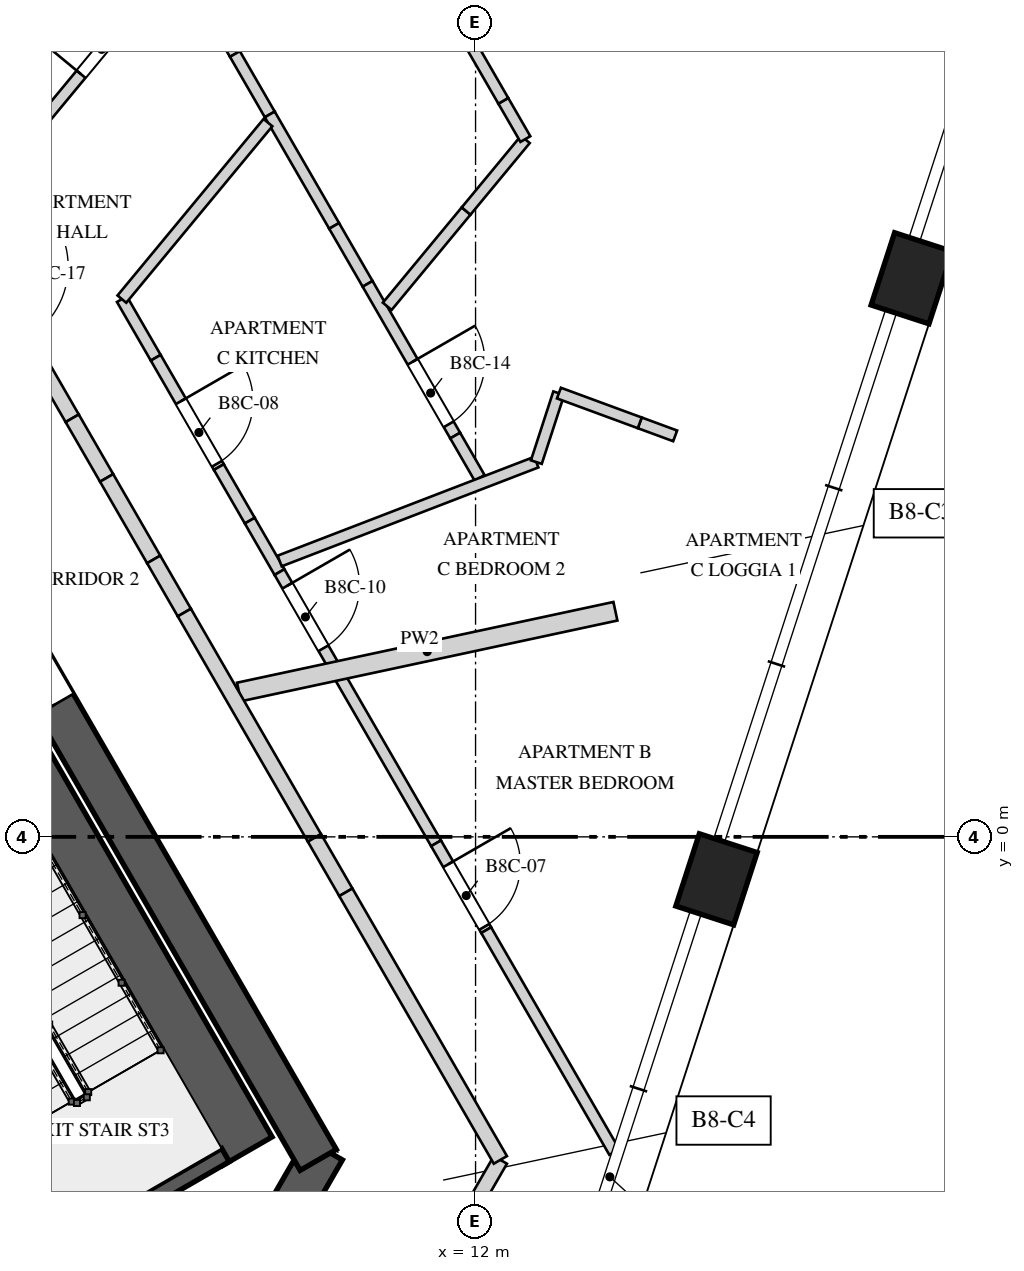
"""IFC4 building model, lengths in metres.
Left out: names, types, materials, properties, quantities, classifications, styles, units other than length and angle.
Written with IfcOpenShell. Run it as: python <this file> out.ifc"""

import sys

from ifc_helpers import new_model, si_unit, direction, frame, frame_2d, origin, origin_2d, place, context, subcontext, project, spatial, polyline, rectangle, outline, extrude, element, fill, save


model = new_model("IFC4")
c1 = context("Model", 3, precision=1e-05, world=origin(), true_north=direction((0.0, 1.0)))
c2 = subcontext(c1, "Body", "Model", "MODEL_VIEW")
j1 = project(units=[si_unit("LENGTHUNIT", "METRE"), si_unit("PLANEANGLEUNIT", "RADIAN")], contexts=[c1])
p1 = place(None, origin())
s1 = spatial("IfcSite", under=j1, at=p1, CompositionType="ELEMENT")
p2 = place(p1, origin())
s2 = spatial("IfcBuilding", under=s1, at=p2, CompositionType="ELEMENT")
p3 = place(p2, frame((0.0, 0.0, 348.4)))
s3 = spatial("IfcBuildingStorey", under=s2, at=p3, CompositionType="ELEMENT", Elevation=348.4)
p4 = place(p3, frame((8.566, -6.613, 0.0), z_axis=(0.0, 0.0, 1.0), x_axis=(0.499995765644, 0.866027848477, 0.0)))
e1 = element("IfcWall", 1, at=p4, inside=s3, PredefinedType="SHEAR", context=c2, shape_type="SweptSolid", body=[
    extrude(rectangle(XDim=2.887, YDim=0.55, at=frame_2d((1.443, 0.0))), origin(), (0.0, 0.0, 1.0), 4.0),
])
p5 = place(p3, frame((9.93, -4.25, 0.0), z_axis=(0.0, 0.0, 1.0), x_axis=(-0.499994590896, 0.86602852671, 0.0)))
e2 = element("IfcWall", 2, at=p5, inside=s3, PredefinedType="SHEAR", context=c2, shape_type="SweptSolid", body=[
    extrude(rectangle(XDim=17.292, YDim=0.55, at=frame_2d((8.646, 0.0))), origin(), (0.0, 0.0, 1.0), 4.0),
])
p6 = place(p5, frame((6.921, 0.0, 0.0)))
e3 = element("IfcOpeningElement", 3, at=p6, cuts=e2, PredefinedType="OPENING", context=c2, shape_type="SweptSolid", body=[
    extrude(rectangle(XDim=1.0, YDim=2.4, at=frame_2d((0.5, 1.2))), frame((0.0, 0.285, 0.0), z_axis=(0.0, -1.0, 0.0), x_axis=(1.0, 0.0, 0.0)), (0.0, 0.0, 1.0), 0.57),
])
for number, where, z_axis, x_axis in (
    (4, (15.17, -0.558, 0.0), (0.0, 0.0, 1.0), (0.309, 0.951, 0.0)),
    (5, (17.739, 7.349, 0.0), (0.0, 0.0, 1.0), (0.309, 0.951, 0.0)),
):
    element("IfcColumn", number, at=place(p3, frame(where, z_axis=z_axis, x_axis=x_axis)), inside=s3, PredefinedType="COLUMN", context=c2, shape_type="SweptSolid", body=[
        extrude(rectangle(XDim=1.0, YDim=0.8, at=origin_2d()), origin(), (0.0, 0.0, 1.0), 4.0),
    ])
p7 = place(p3, frame((8.998, -4.135, 0.0), z_axis=(0.0, 0.0, 1.0), x_axis=(-0.500009909098, 0.866019682689, 0.0)))
e6 = element("IfcWall", 6, at=p7, inside=s3, PredefinedType="SOLIDWALL", context=c2, shape_type="SweptSolid", body=[
    extrude(rectangle(XDim=6.2, YDim=0.75, at=frame_2d((3.1, 0.0))), origin(), (0.0, 0.0, 1.0), 3.65),
])
p8 = place(p3, frame((6.465, -5.597, 0.0), z_axis=(0.0, 0.0, 1.0), x_axis=(-0.49998037582, 0.866036733513, 0.0)))
e7 = element("IfcWall", 7, at=p8, inside=s3, PredefinedType="SOLIDWALL", context=c2, shape_type="SweptSolid", body=[
    extrude(rectangle(XDim=6.2, YDim=0.2, at=frame_2d((3.1, 0.0))), origin(), (0.0, 0.0, 1.0), 3.65),
])
p9 = place(p3, frame((6.501, -5.461, 0.0), z_axis=(0.0, 0.0, 1.0), x_axis=(0.865989465428, 0.500062241894, 0.0)))
e8 = element("IfcWall", 8, at=p9, inside=s3, PredefinedType="SOLIDWALL", context=c2, shape_type="SweptSolid", body=[
    extrude(rectangle(XDim=2.55, YDim=0.2, at=frame_2d((1.275, 0.0))), origin(), (0.0, 0.0, 1.0), 3.65),
])
p10 = place(p3, frame((6.12, 9.199, 0.0), z_axis=(0.0, 0.0, 1.0), x_axis=(0.63755942525, 0.770401180733, 0.0)))
e9 = element("IfcWall", 9, at=p10, inside=s3, PredefinedType="PARTITIONING", context=c2, shape_type="SweptSolid", body=[
    extrude(rectangle(XDim=3.014, YDim=0.15, at=frame_2d((1.507, 0.0))), origin(), (0.0, 0.0, 1.0), 3.65),
])
p11 = place(p10, frame((1.082, 0.0, 0.0)))
e10 = element("IfcOpeningElement", 10, at=p11, cuts=e9, PredefinedType="OPENING", context=c2, shape_type="SweptSolid", body=[
    extrude(rectangle(XDim=0.85, YDim=2.4, at=frame_2d((0.425, 1.2))), frame((0.0, 0.085, 0.0), z_axis=(0.0, -1.0, 0.0), x_axis=(1.0, 0.0, 0.0)), (0.0, 0.0, 1.0), 0.17),
])
p12 = place(p3, frame((7.347, 7.074, 0.0), z_axis=(0.0, 0.0, 1.0), x_axis=(0.499944022619, -0.866057719929, 0.0)))
e11 = element("IfcWall", 11, at=p12, inside=s3, PredefinedType="PARTITIONING", context=c2, shape_type="SweptSolid", body=[
    extrude(rectangle(XDim=0.89, YDim=0.15, at=frame_2d((0.445, 0.0))), origin(), (0.0, 0.0, 1.0), 3.65),
])
p13 = place(p3, frame((7.792, 6.303, 0.0), z_axis=(0.0, 0.0, 1.0), x_axis=(0.500027802648, -0.866009351323, 0.0)))
e12 = element("IfcWall", 12, at=p13, inside=s3, PredefinedType="PARTITIONING", context=c2, shape_type="SweptSolid", body=[
    extrude(outline(polyline([(0.0, 0.0), (1.661, 0.0), (1.661, 3.65), (0.881, 3.65), (0.881, 2.55), (0.0, 2.55), (0.0, 0.0)])), frame((0.0, 0.075, 0.0), z_axis=(0.0, -1.0, 0.0), x_axis=(1.0, 0.0, 0.0)), (0.0, 0.0, 1.0), 0.15),
])
p14 = place(p13, frame((0.661, 0.0, 0.0)))
e13 = element("IfcOpeningElement", 13, at=p14, cuts=e12, PredefinedType="OPENING", context=c2, shape_type="SweptSolid", body=[
    extrude(rectangle(XDim=0.95, YDim=2.4, at=frame_2d((0.475, 1.2))), frame((0.0, 0.085, 0.0), z_axis=(0.0, -1.0, 0.0), x_axis=(1.0, 0.0, 0.0)), (0.0, 0.0, 1.0), 0.17),
])
p15 = place(p3, frame((8.623, 4.865, 0.0), z_axis=(0.0, 0.0, 1.0), x_axis=(0.500042693391, -0.866000753341, 0.0)))
e14 = element("IfcWall", 14, at=p15, inside=s3, PredefinedType="PARTITIONING", context=c2, shape_type="SweptSolid", body=[
    extrude(rectangle(XDim=0.814, YDim=0.15, at=frame_2d((0.407, 0.0))), origin(), (0.0, 0.0, 1.0), 3.65),
])
p16 = place(p3, frame((9.03, 4.16, 0.0), z_axis=(0.0, 0.0, 1.0), x_axis=(0.499767520639, -0.866159584207, 0.0)))
e15 = element("IfcWall", 15, at=p16, inside=s3, PredefinedType="PARTITIONING", context=c2, shape_type="SweptSolid", body=[
    extrude(rectangle(XDim=0.781, YDim=0.15, at=frame_2d((0.391, 0.0))), origin(), (0.0, 0.0, 1.0), 2.75),
])
p17 = place(p3, frame((9.42, 3.483, 0.0), z_axis=(0.0, 0.0, 1.0), x_axis=(0.50002680699, -0.866009926209, 0.0)))
e16 = element("IfcWall", 16, at=p17, inside=s3, PredefinedType="PARTITIONING", context=c2, shape_type="SweptSolid", body=[
    extrude(rectangle(XDim=4.12, YDim=0.15, at=frame_2d((2.06, 0.0))), origin(), (0.0, 0.0, 1.0), 3.65),
])
p18 = place(p17, frame((0.207, 0.0, 0.0)))
e17 = element("IfcOpeningElement", 17, at=p18, cuts=e16, PredefinedType="OPENING", context=c2, shape_type="SweptSolid", body=[
    extrude(rectangle(XDim=0.95, YDim=2.4, at=frame_2d((0.475, 1.2))), frame((0.0, 0.085, 0.0), z_axis=(0.0, -1.0, 0.0), x_axis=(1.0, 0.0, 0.0)), (0.0, 0.0, 1.0), 0.17),
])
p19 = place(p3, frame((11.48, -0.085, 0.0), z_axis=(0.0, 0.0, 1.0), x_axis=(0.499941428866, -0.866059217203, 0.0)))
e18 = element("IfcWall", 18, at=p19, inside=s3, PredefinedType="PARTITIONING", context=c2, shape_type="SweptSolid", body=[
    extrude(outline(polyline([(0.0, 0.0), (1.319, 0.0), (1.319, 3.65), (0.797, 3.65), (0.797, 2.95), (0.0, 2.95), (0.0, 0.0)])), frame((0.0, 0.075, 0.0), z_axis=(0.0, -1.0, 0.0), x_axis=(1.0, 0.0, 0.0)), (0.0, 0.0, 1.0), 0.15),
])
p20 = place(p19, frame((0.319, 0.0, 0.0)))
e19 = element("IfcOpeningElement", 19, at=p20, cuts=e18, PredefinedType="OPENING", context=c2, shape_type="SweptSolid", body=[
    extrude(rectangle(XDim=0.95, YDim=2.4, at=frame_2d((0.475, 1.2))), frame((0.0, 0.085, 0.0), z_axis=(0.0, -1.0, 0.0), x_axis=(1.0, 0.0, 0.0)), (0.0, 0.0, 1.0), 0.17),
])
p21 = place(p3, frame((12.14, -1.227, 0.0), z_axis=(0.0, 0.0, 1.0), x_axis=(0.499979511309, -0.866037232612, 0.0)))
e20 = element("IfcWall", 20, at=p21, inside=s3, PredefinedType="PARTITIONING", context=c2, shape_type="SweptSolid", body=[
    extrude(rectangle(XDim=3.371, YDim=0.15, at=frame_2d((1.686, 0.0))), origin(), (0.0, 0.0, 1.0), 3.65),
])
p22 = place(p3, frame((7.407, 12.771, 0.0), z_axis=(0.0, 0.0, 1.0), x_axis=(0.499966841219, -0.866044547169, 0.0)))
e21 = element("IfcWall", 21, at=p22, inside=s3, PredefinedType="PARTITIONING", context=c2, shape_type="SweptSolid", body=[
    extrude(rectangle(XDim=2.854, YDim=0.15, at=frame_2d((1.427, 0.0))), origin(), (0.0, 0.0, 1.0), 3.65),
])
p23 = place(p3, frame((8.834, 10.299, 0.0), z_axis=(0.0, 0.0, 1.0), x_axis=(0.499945096919, -0.866057099772, 0.0)))
e22 = element("IfcWall", 22, at=p23, inside=s3, PredefinedType="PARTITIONING", context=c2, shape_type="SweptSolid", body=[
    extrude(rectangle(XDim=0.917, YDim=0.15, at=frame_2d((0.459, 0.0))), origin(), (0.0, 0.0, 1.0), 2.55),
])
p24 = place(p3, frame((9.293, 9.504, 0.0), z_axis=(0.0, 0.0, 1.0), x_axis=(0.500046963369, -0.865998287773, 0.0)))
e23 = element("IfcWall", 23, at=p24, inside=s3, PredefinedType="PARTITIONING", context=c2, shape_type="SweptSolid", body=[
    extrude(rectangle(XDim=1.693, YDim=0.15, at=frame_2d((0.847, 0.0))), origin(), (0.0, 0.0, 1.0), 3.65),
])
p25 = place(p3, frame((10.139, 8.038, 0.0), z_axis=(0.0, 0.0, 1.0), x_axis=(0.499866452165, -0.866102493935, 0.0)))
e24 = element("IfcWall", 24, at=p25, inside=s3, PredefinedType="PARTITIONING", context=c2, shape_type="SweptSolid", body=[
    extrude(rectangle(XDim=0.881, YDim=0.15, at=frame_2d((0.44, 0.0))), origin(), (0.0, 0.0, 1.0), 2.55),
])
p26 = place(p3, frame((10.58, 7.275, 0.0), z_axis=(0.0, 0.0, 1.0), x_axis=(0.500012835235, -0.866017993231, 0.0)))
e25 = element("IfcWall", 25, at=p26, inside=s3, PredefinedType="PARTITIONING", context=c2, shape_type="SweptSolid", body=[
    extrude(rectangle(XDim=2.305, YDim=0.15, at=frame_2d((1.152, 0.0))), origin(), (0.0, 0.0, 1.0), 3.65),
])
p27 = place(p26, frame((1.184, 0.0, 0.0)))
e26 = element("IfcOpeningElement", 26, at=p27, cuts=e25, PredefinedType="OPENING", context=c2, shape_type="SweptSolid", body=[
    extrude(rectangle(XDim=0.95, YDim=2.4, at=frame_2d((0.475, 1.2))), frame((0.0, 0.085, 0.0), z_axis=(0.0, -1.0, 0.0), x_axis=(1.0, 0.0, 0.0)), (0.0, 0.0, 1.0), 0.17),
])
p28 = place(p3, frame((11.732, 5.28, 0.0), z_axis=(0.0, 0.0, 1.0), x_axis=(0.500182682664, -0.865919906206, 0.0)))
e27 = element("IfcWall", 27, at=p28, inside=s3, PredefinedType="PARTITIONING", context=c2, shape_type="SweptSolid", body=[
    extrude(rectangle(XDim=0.643, YDim=0.15, at=frame_2d((0.321, 0.0))), origin(), (0.0, 0.0, 1.0), 2.75),
])
p29 = place(p3, frame((8.888, 1.906, 0.0), z_axis=(0.0, 0.0, 1.0), x_axis=(0.977766421374, 0.209696984321, 0.0)))
e28 = element("IfcWall", 28, at=p29, inside=s3, PredefinedType="SOLIDWALL", context=c2, shape_type="SweptSolid", body=[
    extrude(rectangle(XDim=5.064, YDim=0.25, at=frame_2d((2.532, 0.0))), origin(), (0.0, 0.0, 1.0), 3.65),
])
p30 = place(p3, frame((9.269, 9.396, 0.0), z_axis=(0.0, 0.0, 1.0), x_axis=(-0.637511345934, -0.770440967113, 0.0)))
e29 = element("IfcWall", 29, at=p30, inside=s3, PredefinedType="PARTITIONING", context=c2, shape_type="SweptSolid", body=[
    extrude(rectangle(XDim=3.014, YDim=0.15, at=frame_2d((1.507, 0.0))), origin(), (0.0, 0.0, 1.0), 3.65),
])
p31 = place(p3, frame((10.838, 6.98, 0.0), z_axis=(0.0, 0.0, 1.0), x_axis=(0.637509370169, 0.770442601981, 0.0)))
e30 = element("IfcWall", 30, at=p31, inside=s3, PredefinedType="PARTITIONING", context=c2, shape_type="SweptSolid", body=[
    extrude(rectangle(XDim=1.627, YDim=0.15, at=frame_2d((0.813, 0.0))), origin(), (0.0, 0.0, 1.0), 3.65),
])
p32 = place(p3, frame((11.875, 8.233, 0.0), z_axis=(0.0, 0.0, 1.0), x_axis=(0.637588147155, 0.770377410499, 0.0)))
e31 = element("IfcWall", 31, at=p32, inside=s3, PredefinedType="PARTITIONING", context=c2, shape_type="SweptSolid", body=[
    extrude(rectangle(XDim=1.223, YDim=0.15, at=frame_2d((0.611, 0.0))), origin(), (0.0, 0.0, 1.0), 2.55),
])
p33 = place(p3, frame((12.656, 9.18, 0.0), z_axis=(0.0, 0.0, 1.0), x_axis=(-0.500025556299, 0.866010648346, 0.0)))
e32 = element("IfcWall", 32, at=p33, inside=s3, PredefinedType="PARTITIONING", context=c2, shape_type="SweptSolid", body=[
    extrude(rectangle(XDim=0.581, YDim=0.15, at=frame_2d((0.291, 0.0))), origin(), (0.0, 0.0, 1.0), 2.55),
])
p34 = place(p3, frame((12.365, 9.683, 0.0), z_axis=(0.0, 0.0, 1.0), x_axis=(-0.499966648284, 0.866044658551, 0.0)))
e33 = element("IfcWall", 33, at=p34, inside=s3, PredefinedType="PARTITIONING", context=c2, shape_type="SweptSolid", body=[
    extrude(rectangle(XDim=2.25, YDim=0.15, at=frame_2d((1.125, 0.0))), origin(), (0.0, 0.0, 1.0), 3.65),
])
p35 = place(p3, frame((12.8, 4.93, 0.0), z_axis=(0.0, 0.0, 1.0), x_axis=(-0.933173371739, -0.359426568685, 0.0)))
e34 = element("IfcWall", 34, at=p35, inside=s3, PredefinedType="PARTITIONING", context=c2, shape_type="SweptSolid", body=[
    extrude(rectangle(XDim=3.619, YDim=0.15, at=frame_2d((1.81, 0.0))), origin(), (0.0, 0.0, 1.0), 2.75),
])
p36 = place(p3, frame((13.094, 5.837, 0.0), z_axis=(0.0, 0.0, 1.0), x_axis=(-0.309074492062, -0.951037832243, 0.0)))
e35 = element("IfcWall", 35, at=p36, inside=s3, PredefinedType="PARTITIONING", context=c2, shape_type="SweptSolid", body=[
    extrude(rectangle(XDim=0.953, YDim=0.15, at=frame_2d((0.477, 0.0))), origin(), (0.0, 0.0, 1.0), 2.75),
])
p37 = place(p3, frame((14.626, 5.275, 0.0), z_axis=(0.0, 0.0, 1.0), x_axis=(-0.938334720131, 0.345728148979, 0.0)))
e36 = element("IfcWall", 36, at=p37, inside=s3, PredefinedType="PARTITIONING", context=c2, shape_type="SweptSolid", body=[
    extrude(rectangle(XDim=0.496, YDim=0.15, at=frame_2d((0.248, 0.0))), origin(), (0.0, 0.0, 1.0), 3.65),
])
p38 = place(p3, frame((14.16, 5.447, 0.0), z_axis=(0.0, 0.0, 1.0), x_axis=(-0.938446088478, 0.345425735897, 0.0)))
e37 = element("IfcWall", 37, at=p38, inside=s3, PredefinedType="PARTITIONING", context=c2, shape_type="SweptSolid", body=[
    extrude(rectangle(XDim=1.133, YDim=0.15, at=frame_2d((0.566, 0.0))), origin(), (0.0, 0.0, 1.0), 2.75),
])
p39 = place(p3, frame((12.326, -4.25, 0.0), z_axis=(0.0, 0.0, 1.0), x_axis=(-0.500003959331, -0.866023117852, 0.0)))
e38 = element("IfcWall", 38, at=p39, inside=s3, PredefinedType="SOLIDWALL", context=c2, shape_type="SweptSolid", body=[
    extrude(rectangle(XDim=3.003, YDim=0.2, at=frame_2d((1.501, 0.0))), origin(), (0.0, 0.0, 1.0), 3.65),
])
p40 = place(p3, frame((6.29, 6.205, 0.0), z_axis=(0.0, 0.0, 1.0), x_axis=(0.500045602705, -0.86599907345, 0.0)))
e39 = element("IfcWall", 39, at=p40, inside=s3, PredefinedType="SOLIDWALL", context=c2, shape_type="SweptSolid", body=[
    extrude(rectangle(XDim=0.807, YDim=0.2, at=frame_2d((0.403, 0.0))), origin(), (0.0, 0.0, 1.0), 3.65),
])
p41 = place(p3, frame((6.693, 5.507, 0.0), z_axis=(0.0, 0.0, 1.0), x_axis=(0.499994660107, -0.866028486751, 0.0)))
e40 = element("IfcWall", 40, at=p41, inside=s3, PredefinedType="SOLIDWALL", context=c2, shape_type="SweptSolid", body=[
    extrude(rectangle(XDim=0.906, YDim=0.2, at=frame_2d((0.453, 0.0))), origin(), (0.0, 0.0, 1.0), 2.55),
])
p42 = place(p3, frame((7.146, 4.722, 0.0), z_axis=(0.0, 0.0, 1.0), x_axis=(0.499955681623, -0.866050989499, 0.0)))
e41 = element("IfcWall", 41, at=p42, inside=s3, PredefinedType="SOLIDWALL", context=c2, shape_type="SweptSolid", body=[
    extrude(rectangle(XDim=1.238, YDim=0.2, at=frame_2d((0.619, 0.0))), origin(), (0.0, 0.0, 1.0), 3.65),
])
p43 = place(p3, frame((7.765, 3.65, 0.0), z_axis=(0.0, 0.0, 1.0), x_axis=(0.500141487433, -0.865943700565, 0.0)))
e42 = element("IfcWall", 42, at=p43, inside=s3, PredefinedType="SOLIDWALL", context=c2, shape_type="SweptSolid", body=[
    extrude(rectangle(XDim=0.807, YDim=0.2, at=frame_2d((0.403, 0.0))), origin(), (0.0, 0.0, 1.0), 2.75),
])
p44 = place(p3, frame((8.169, 2.951, 0.0), z_axis=(0.0, 0.0, 1.0), x_axis=(0.499959115548, -0.866049007147, 0.0)))
e43 = element("IfcWall", 43, at=p44, inside=s3, PredefinedType="SOLIDWALL", context=c2, shape_type="SweptSolid", body=[
    extrude(rectangle(XDim=3.423, YDim=0.2, at=frame_2d((1.711, 0.0))), origin(), (0.0, 0.0, 1.0), 3.65),
])
p45 = place(p3, frame((9.88, -0.013, 0.0), z_axis=(0.0, 0.0, 1.0), x_axis=(0.499952654668, -0.866052736899, 0.0)))
e44 = element("IfcWall", 44, at=p45, inside=s3, PredefinedType="SOLIDWALL", context=c2, shape_type="SweptSolid", body=[
    extrude(rectangle(XDim=0.826, YDim=0.2, at=frame_2d((0.413, 0.0))), origin(), (0.0, 0.0, 1.0), 2.95),
])
p46 = place(p3, frame((10.293, -0.729, 0.0), z_axis=(0.0, 0.0, 1.0), x_axis=(0.50002046505, -0.86601358796, 0.0)))
e45 = element("IfcWall", 45, at=p46, inside=s3, PredefinedType="SOLIDWALL", context=c2, shape_type="SweptSolid", body=[
    extrude(rectangle(XDim=4.066, YDim=0.2, at=frame_2d((2.033, 0.0))), origin(), (0.0, 0.0, 1.0), 3.65),
])
p47 = place(p6, origin())
e46 = element("IfcDoor", 46, at=p47, inside=s3, OperationType="SINGLE_SWING_RIGHT", PredefinedType="DOOR", context=c2, shape_type="SweptSolid", body=[
    extrude(rectangle(XDim=1.0, YDim=2.4, at=frame_2d((0.5, 1.2))), frame((0.0, 0.025, 0.0), z_axis=(0.0, -1.0, 0.0), x_axis=(1.0, 0.0, 0.0)), (0.0, 0.0, 1.0), 0.05),
])
fill(e3, e46)
p48 = place(p20, origin())
e47 = element("IfcDoor", 47, at=p48, inside=s3, OperationType="SINGLE_SWING_LEFT", PredefinedType="DOOR", context=c2, shape_type="SweptSolid", body=[
    extrude(rectangle(XDim=0.95, YDim=2.4, at=frame_2d((0.475, 1.2))), frame((0.0, 0.025, 0.0), z_axis=(0.0, -1.0, 0.0), x_axis=(1.0, 0.0, 0.0)), (0.0, 0.0, 1.0), 0.05),
])
fill(e19, e47)
p49 = place(p14, origin())
e48 = element("IfcDoor", 48, at=p49, inside=s3, OperationType="SINGLE_SWING_RIGHT", PredefinedType="DOOR", context=c2, shape_type="SweptSolid", body=[
    extrude(rectangle(XDim=0.95, YDim=2.4, at=frame_2d((0.475, 1.2))), frame((0.0, 0.025, 0.0), z_axis=(0.0, -1.0, 0.0), x_axis=(1.0, 0.0, 0.0)), (0.0, 0.0, 1.0), 0.05),
])
fill(e13, e48)
p50 = place(p11, origin())
e49 = element("IfcDoor", 49, at=p50, inside=s3, OperationType="SINGLE_SWING_LEFT", PredefinedType="DOOR", context=c2, shape_type="SweptSolid", body=[
    extrude(rectangle(XDim=0.85, YDim=2.4, at=frame_2d((0.425, 1.2))), frame((0.0, 0.025, 0.0), z_axis=(0.0, -1.0, 0.0), x_axis=(1.0, 0.0, 0.0)), (0.0, 0.0, 1.0), 0.05),
])
fill(e10, e49)
p51 = place(p18, origin())
e50 = element("IfcDoor", 50, at=p51, inside=s3, OperationType="SINGLE_SWING_RIGHT", PredefinedType="DOOR", context=c2, shape_type="SweptSolid", body=[
    extrude(rectangle(XDim=0.95, YDim=2.4, at=frame_2d((0.475, 1.2))), frame((0.0, 0.025, 0.0), z_axis=(0.0, -1.0, 0.0), x_axis=(1.0, 0.0, 0.0)), (0.0, 0.0, 1.0), 0.05),
])
fill(e17, e50)
p52 = place(p27, origin())
e51 = element("IfcDoor", 51, at=p52, inside=s3, OperationType="SINGLE_SWING_RIGHT", PredefinedType="DOOR", context=c2, shape_type="SweptSolid", body=[
    extrude(rectangle(XDim=0.95, YDim=2.4, at=frame_2d((0.475, 1.2))), frame((0.0, 0.025, 0.0), z_axis=(0.0, -1.0, 0.0), x_axis=(1.0, 0.0, 0.0)), (0.0, 0.0, 1.0), 0.05),
])
fill(e26, e51)
save(model, sys.argv[1])
